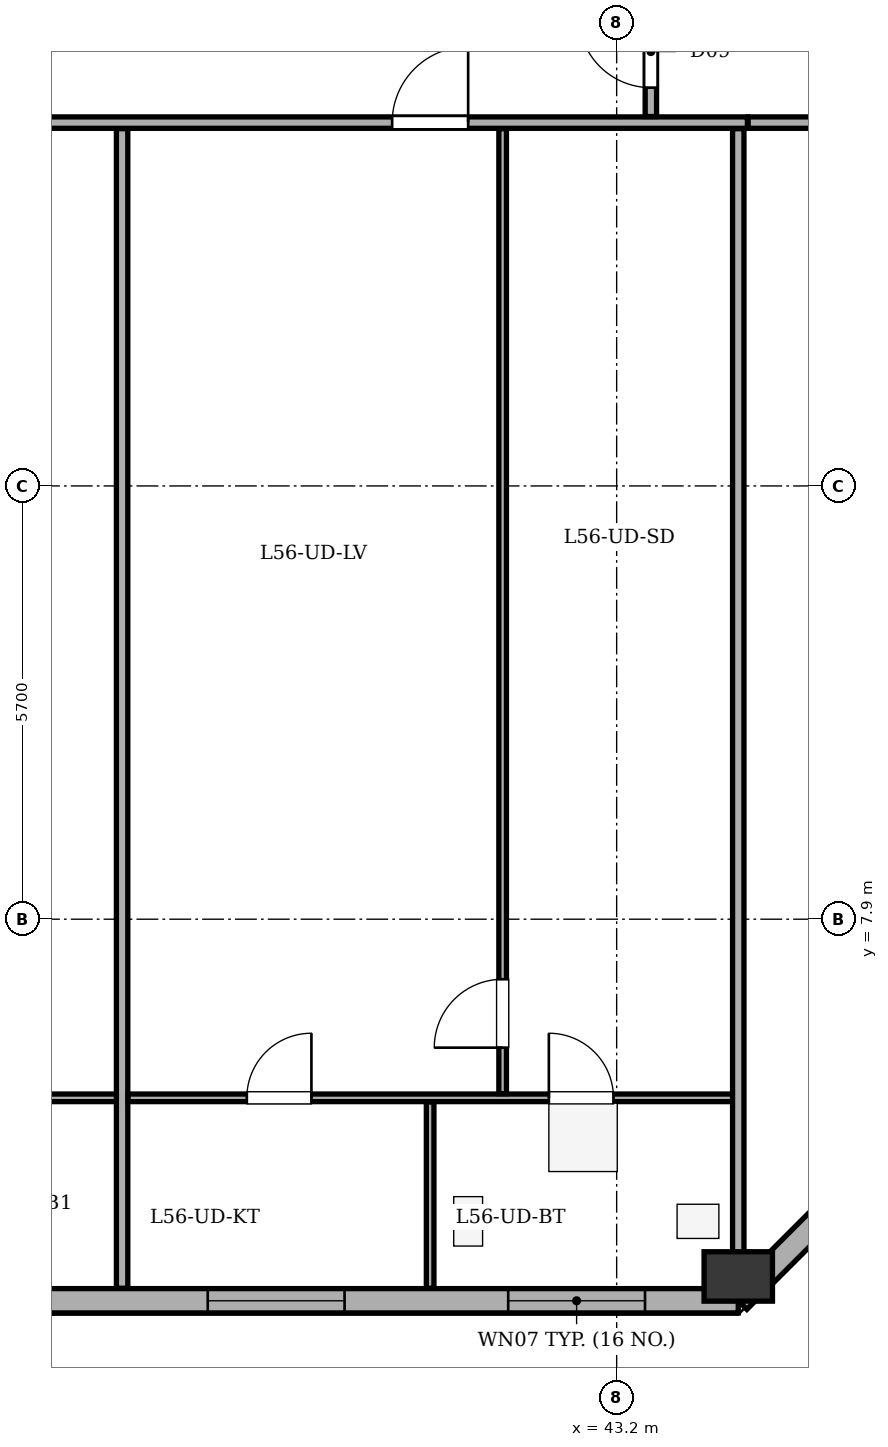
"""IFC4 building model, lengths in metres.
Left out: names, types, materials, properties, quantities, classifications, styles, units other than length and angle.
Written with IfcOpenShell. Run it as: python <this file> out.ifc"""

import sys

from ifc_helpers import new_model, si_unit, direction, frame, frame_2d, origin, origin_2d, place, context, subcontext, project, spatial, rectangle, extrude, element, fill, save


model = new_model("IFC4")
c1 = context("Model", 3, precision=1e-05, world=origin(), true_north=direction((0.0, 1.0)))
c2 = subcontext(c1, "Body", "Model", "MODEL_VIEW")
j1 = project(units=[si_unit("LENGTHUNIT", "METRE"), si_unit("PLANEANGLEUNIT", "RADIAN")], contexts=[c1])
p1 = place(None, origin())
s1 = spatial("IfcSite", under=j1, at=p1, CompositionType="ELEMENT")
p2 = place(p1, origin())
s2 = spatial("IfcBuilding", under=s1, at=p2, CompositionType="ELEMENT")
p3 = place(p2, frame((0.0, 0.0, 217.7)))
s3 = spatial("IfcBuildingStorey", under=s2, at=p3, CompositionType="ELEMENT", Elevation=217.7)
p4 = place(p3, frame((44.8, 3.2, 0.0), z_axis=(0.0, 0.0, 1.0), x_axis=(1.0, 0.0, 0.0)))
e1 = element("IfcColumn", 1, at=p4, inside=s3, PredefinedType="COLUMN", context=c2, shape_type="SweptSolid", body=[
    extrude(rectangle(XDim=0.65, YDim=0.9, at=origin_2d()), origin(), (0.0, 0.0, 1.0), 3.4),
])
p5 = place(p3, frame((44.8, 2.88, 0.0), z_axis=(0.0, 0.0, 1.0), x_axis=(-1.0, 0.0, 0.0)))
e2 = element("IfcWall", 2, at=p5, inside=s3, PredefinedType="STANDARD", context=c2, shape_type="SweptSolid", body=[
    extrude(rectangle(XDim=36.0, YDim=0.32, at=frame_2d((18.0, 0.0))), origin(), (0.0, 0.0, 1.0), 2.725),
])
p6 = place(p5, frame((20.1, 0.0, 0.0)))
e3 = element("IfcOpeningElement", 3, at=p6, cuts=e2, PredefinedType="OPENING", context=c2, shape_type="SweptSolid", body=[
    extrude(rectangle(XDim=1.0, YDim=2.02, at=frame_2d((0.5, 1.01))), frame((0.0, 0.17, 0.0), z_axis=(0.0, -1.0, 0.0), x_axis=(1.0, 0.0, 0.0)), (0.0, 0.0, 1.0), 0.34),
])
p7 = place(p5, frame((1.227, 0.0, 0.75)))
e4 = element("IfcOpeningElement", 4, at=p7, cuts=e2, PredefinedType="OPENING", context=c2, shape_type="SweptSolid", body=[
    extrude(rectangle(XDim=1.8, YDim=1.7, at=frame_2d((0.9, 0.85))), frame((0.0, 0.17, 0.0), z_axis=(0.0, -1.0, 0.0), x_axis=(1.0, 0.0, 0.0)), (0.0, 0.0, 1.0), 0.34),
])
p8 = place(p5, frame((5.18, 0.0, 0.75)))
e5 = element("IfcOpeningElement", 5, at=p8, cuts=e2, PredefinedType="OPENING", context=c2, shape_type="SweptSolid", body=[
    extrude(rectangle(XDim=1.8, YDim=1.7, at=frame_2d((0.9, 0.85))), frame((0.0, 0.17, 0.0), z_axis=(0.0, -1.0, 0.0), x_axis=(1.0, 0.0, 0.0)), (0.0, 0.0, 1.0), 0.34),
])
p9 = place(p5, frame((12.548, 0.0, 0.75)))
e6 = element("IfcOpeningElement", 6, at=p9, cuts=e2, PredefinedType="OPENING", context=c2, shape_type="SweptSolid", body=[
    extrude(rectangle(XDim=1.25, YDim=1.7, at=frame_2d((0.625, 0.85))), frame((0.0, 0.17, 0.0), z_axis=(0.0, -1.0, 0.0), x_axis=(1.0, 0.0, 0.0)), (0.0, 0.0, 1.0), 0.34),
])
p10 = place(p5, frame((26.8, 0.0, 0.75)))
e7 = element("IfcOpeningElement", 7, at=p10, cuts=e2, PredefinedType="OPENING", context=c2, shape_type="SweptSolid", body=[
    extrude(rectangle(XDim=1.8, YDim=1.7, at=frame_2d((0.9, 0.85))), frame((0.0, 0.17, 0.0), z_axis=(0.0, -1.0, 0.0), x_axis=(1.0, 0.0, 0.0)), (0.0, 0.0, 1.0), 0.34),
])
p11 = place(p5, frame((30.854, 0.0, 0.75)))
e8 = element("IfcOpeningElement", 8, at=p11, cuts=e2, PredefinedType="OPENING", context=c2, shape_type="SweptSolid", body=[
    extrude(rectangle(XDim=1.8, YDim=1.7, at=frame_2d((0.9, 0.85))), frame((0.0, 0.17, 0.0), z_axis=(0.0, -1.0, 0.0), x_axis=(1.0, 0.0, 0.0)), (0.0, 0.0, 1.0), 0.34),
])
p12 = place(p5, frame((10.33, 0.0, 0.75)))
e9 = element("IfcOpeningElement", 9, at=p12, cuts=e2, PredefinedType="OPENING", context=c2, shape_type="SweptSolid", body=[
    extrude(rectangle(XDim=0.75, YDim=1.45, at=frame_2d((0.375, 0.725))), frame((0.0, 0.17, 0.0), z_axis=(0.0, -1.0, 0.0), x_axis=(1.0, 0.0, 0.0)), (0.0, 0.0, 1.0), 0.34),
])
p13 = place(p3, frame((49.12, 7.2, 0.0), z_axis=(0.0, 0.0, 1.0), x_axis=(-0.707106781187, -0.707106781187, 0.0)))
e10 = element("IfcWall", 10, at=p13, inside=s3, PredefinedType="STANDARD", context=c2, shape_type="SweptSolid", body=[
    extrude(rectangle(XDim=6.11, YDim=0.32, at=frame_2d((3.055, 0.0))), origin(), (0.0, 0.0, 1.0), 2.725),
])
p14 = place(p13, frame((2.355, 0.0, 0.75)))
e11 = element("IfcOpeningElement", 11, at=p14, cuts=e10, PredefinedType="OPENING", context=c2, shape_type="SweptSolid", body=[
    extrude(rectangle(XDim=1.4, YDim=1.65, at=frame_2d((0.7, 0.825))), frame((0.0, 0.17, 0.0), z_axis=(0.0, -1.0, 0.0), x_axis=(1.0, 0.0, 0.0)), (0.0, 0.0, 1.0), 0.34),
])
p15 = place(p3, frame((10.9, 18.38, 0.0), z_axis=(0.0, 0.0, 1.0), x_axis=(1.0, 0.0, 0.0)))
e12 = element("IfcWall", 12, at=p15, inside=s3, PredefinedType="PARTITIONING", context=c2, shape_type="SweptSolid", body=[
    extrude(rectangle(XDim=34.02, YDim=0.15, at=frame_2d((17.01, 0.0))), origin(), (0.0, 0.0, 1.0), 3.1),
])
p16 = place(p15, frame((3.674, 0.0, 0.0)))
e13 = element("IfcOpeningElement", 13, at=p16, cuts=e12, PredefinedType="OPENING", context=c2, shape_type="SweptSolid", body=[
    extrude(rectangle(XDim=1.0, YDim=2.1, at=frame_2d((0.5, 1.05))), frame((0.0, 0.085, 0.0), z_axis=(0.0, -1.0, 0.0), x_axis=(1.0, 0.0, 0.0)), (0.0, 0.0, 1.0), 0.17),
])
p17 = place(p15, frame((12.118, 0.0, 0.0)))
e14 = element("IfcOpeningElement", 14, at=p17, cuts=e12, PredefinedType="OPENING", context=c2, shape_type="SweptSolid", body=[
    extrude(rectangle(XDim=1.0, YDim=2.1, at=frame_2d((0.5, 1.05))), frame((0.0, 0.085, 0.0), z_axis=(0.0, -1.0, 0.0), x_axis=(1.0, 0.0, 0.0)), (0.0, 0.0, 1.0), 0.17),
])
p18 = place(p15, frame((20.901, 0.0, 0.0)))
e15 = element("IfcOpeningElement", 15, at=p18, cuts=e12, PredefinedType="OPENING", context=c2, shape_type="SweptSolid", body=[
    extrude(rectangle(XDim=1.0, YDim=2.1, at=frame_2d((0.5, 1.05))), frame((0.0, 0.085, 0.0), z_axis=(0.0, -1.0, 0.0), x_axis=(1.0, 0.0, 0.0)), (0.0, 0.0, 1.0), 0.17),
])
p19 = place(p15, frame((29.346, 0.0, 0.0)))
e16 = element("IfcOpeningElement", 16, at=p19, cuts=e12, PredefinedType="OPENING", context=c2, shape_type="SweptSolid", body=[
    extrude(rectangle(XDim=1.0, YDim=2.1, at=frame_2d((0.5, 1.05))), frame((0.0, 0.085, 0.0), z_axis=(0.0, -1.0, 0.0), x_axis=(1.0, 0.0, 0.0)), (0.0, 0.0, 1.0), 0.17),
])
p20 = place(p3, frame((27.99, 5.55, 0.0), z_axis=(0.0, 0.0, 1.0), x_axis=(1.0, 0.0, 0.0)))
e17 = element("IfcWall", 17, at=p20, inside=s3, PredefinedType="PARTITIONING", context=c2, shape_type="SweptSolid", body=[
    extrude(rectangle(XDim=8.743, YDim=0.1, at=frame_2d((4.372, 0.0))), origin(), (0.0, 0.0, 1.0), 3.1),
])
p21 = place(p20, frame((0.625, 0.0, 0.0)))
e18 = element("IfcOpeningElement", 18, at=p21, cuts=e17, PredefinedType="OPENING", context=c2, shape_type="SweptSolid", body=[
    extrude(rectangle(XDim=0.85, YDim=2.05, at=frame_2d((0.425, 1.025))), frame((0.0, 0.06, 0.0), z_axis=(0.0, -1.0, 0.0), x_axis=(1.0, 0.0, 0.0)), (0.0, 0.0, 1.0), 0.12),
])
p22 = place(p20, frame((3.212, 0.0, 0.0)))
e19 = element("IfcOpeningElement", 19, at=p22, cuts=e17, PredefinedType="OPENING", context=c2, shape_type="SweptSolid", body=[
    extrude(rectangle(XDim=0.85, YDim=2.05, at=frame_2d((0.425, 1.025))), frame((0.0, 0.06, 0.0), z_axis=(0.0, -1.0, 0.0), x_axis=(1.0, 0.0, 0.0)), (0.0, 0.0, 1.0), 0.12),
])
p23 = place(p20, frame((6.449, 0.0, 0.0)))
e20 = element("IfcOpeningElement", 20, at=p23, cuts=e17, PredefinedType="OPENING", context=c2, shape_type="SweptSolid", body=[
    extrude(rectangle(XDim=0.9, YDim=2.05, at=frame_2d((0.45, 1.025))), frame((0.0, 0.06, 0.0), z_axis=(0.0, -1.0, 0.0), x_axis=(1.0, 0.0, 0.0)), (0.0, 0.0, 1.0), 0.12),
])
p24 = place(p3, frame((36.693, 3.045, 0.0), z_axis=(0.0, 0.0, 1.0), x_axis=(0.0, 1.0, 0.0)))
e21 = element("IfcWall", 21, at=p24, inside=s3, PredefinedType="PARTITIONING", context=c2, shape_type="SweptSolid", body=[
    extrude(rectangle(XDim=15.255, YDim=0.15, at=frame_2d((7.627, 0.0))), origin(), (0.0, 0.0, 1.0), 2.725),
])
p25 = place(p3, frame((36.773, 5.55, 0.0), z_axis=(0.0, 0.0, 1.0), x_axis=(1.0, 0.0, 0.0)))
e22 = element("IfcWall", 22, at=p25, inside=s3, PredefinedType="PARTITIONING", context=c2, shape_type="SweptSolid", body=[
    extrude(rectangle(XDim=8.067, YDim=0.1, at=frame_2d((4.034, 0.0))), origin(), (0.0, 0.0, 1.0), 3.1),
])
p26 = place(p25, frame((1.561, 0.0, 0.0)))
e23 = element("IfcOpeningElement", 23, at=p26, cuts=e22, PredefinedType="OPENING", context=c2, shape_type="SweptSolid", body=[
    extrude(rectangle(XDim=0.85, YDim=2.05, at=frame_2d((0.425, 1.025))), frame((0.0, 0.06, 0.0), z_axis=(0.0, -1.0, 0.0), x_axis=(1.0, 0.0, 0.0)), (0.0, 0.0, 1.0), 0.12),
])
p27 = place(p25, frame((5.535, 0.0, 0.0)))
e24 = element("IfcOpeningElement", 24, at=p27, cuts=e22, PredefinedType="OPENING", context=c2, shape_type="SweptSolid", body=[
    extrude(rectangle(XDim=0.85, YDim=2.05, at=frame_2d((0.425, 1.025))), frame((0.0, 0.06, 0.0), z_axis=(0.0, -1.0, 0.0), x_axis=(1.0, 0.0, 0.0)), (0.0, 0.0, 1.0), 0.12),
])
p28 = place(p3, frame((41.7, 5.605, 0.0), z_axis=(0.0, 0.0, 1.0), x_axis=(0.0, 1.0, 0.0)))
e25 = element("IfcWall", 25, at=p28, inside=s3, PredefinedType="PARTITIONING", context=c2, shape_type="SweptSolid", body=[
    extrude(rectangle(XDim=12.695, YDim=0.1, at=frame_2d((6.348, 0.0))), origin(), (0.0, 0.0, 1.0), 3.1),
])
p29 = place(p28, frame((0.605, 0.0, 0.0)))
e26 = element("IfcOpeningElement", 26, at=p29, cuts=e25, PredefinedType="OPENING", context=c2, shape_type="SweptSolid", body=[
    extrude(rectangle(XDim=0.9, YDim=2.05, at=frame_2d((0.45, 1.025))), frame((0.0, 0.06, 0.0), z_axis=(0.0, -1.0, 0.0), x_axis=(1.0, 0.0, 0.0)), (0.0, 0.0, 1.0), 0.12),
])
p30 = place(p3, frame((40.746, 3.045, 0.0), z_axis=(0.0, 0.0, 1.0), x_axis=(0.0, 1.0, 0.0)))
e27 = element("IfcWall", 27, at=p30, inside=s3, PredefinedType="PARTITIONING", context=c2, shape_type="SweptSolid", body=[
    extrude(rectangle(XDim=2.45, YDim=0.1, at=frame_2d((1.225, 0.0))), origin(), (0.0, 0.0, 1.0), 3.1),
])
p31 = place(p3, frame((44.8, 3.045, 0.0), z_axis=(0.0, 0.0, 1.0), x_axis=(0.0, 1.0, 0.0)))
e28 = element("IfcWall", 28, at=p31, inside=s3, PredefinedType="PARTITIONING", context=c2, shape_type="SweptSolid", body=[
    extrude(rectangle(XDim=15.255, YDim=0.15, at=frame_2d((7.627, 0.0))), origin(), (0.0, 0.0, 1.0), 3.1),
])
p32 = place(p3, frame((44.93, 18.38, 0.0), z_axis=(0.0, 0.0, 1.0), x_axis=(1.0, 0.0, 0.0)))
e29 = element("IfcWall", 29, at=p32, inside=s3, PredefinedType="PARTITIONING", context=c2, shape_type="SweptSolid", body=[
    extrude(rectangle(XDim=4.025, YDim=0.15, at=frame_2d((2.013, 0.0))), origin(), (0.0, 0.0, 1.0), 3.1),
])
p33 = place(p3, frame((43.65, 18.46, 0.0), z_axis=(0.0, 0.0, 1.0), x_axis=(0.0, 1.0, 0.0)))
e30 = element("IfcWall", 30, at=p33, inside=s3, PredefinedType="PARTITIONING", context=c2, shape_type="SweptSolid", body=[
    extrude(rectangle(XDim=1.79, YDim=0.15, at=frame_2d((0.895, 0.0))), origin(), (0.0, 0.0, 1.0), 3.1),
])
p34 = place(p33, frame((0.38, 0.0, 0.0)))
e31 = element("IfcOpeningElement", 31, at=p34, cuts=e30, PredefinedType="OPENING", context=c2, shape_type="SweptSolid", body=[
    extrude(rectangle(XDim=0.95, YDim=2.1, at=frame_2d((0.475, 1.05))), frame((0.0, 0.085, 0.0), z_axis=(0.0, -1.0, 0.0), x_axis=(1.0, 0.0, 0.0)), (0.0, 0.0, 1.0), 0.17),
])
p35 = place(p7, origin())
e32 = element("IfcWindow", 32, at=p35, inside=s3, PartitioningType="SINGLE_PANEL", PredefinedType="WINDOW", context=c2, shape_type="SweptSolid", body=[
    extrude(rectangle(XDim=1.8, YDim=1.7, at=frame_2d((0.9, 0.85))), frame((0.0, -0.01, 0.0), z_axis=(0.0, -1.0, 0.0), x_axis=(1.0, 0.0, 0.0)), (0.0, 0.0, 1.0), 0.06),
])
fill(e4, e32)
p36 = place(p8, origin())
e33 = element("IfcWindow", 33, at=p36, inside=s3, PartitioningType="SINGLE_PANEL", PredefinedType="WINDOW", context=c2, shape_type="SweptSolid", body=[
    extrude(rectangle(XDim=1.8, YDim=1.7, at=frame_2d((0.9, 0.85))), frame((0.0, -0.01, 0.0), z_axis=(0.0, -1.0, 0.0), x_axis=(1.0, 0.0, 0.0)), (0.0, 0.0, 1.0), 0.06),
])
fill(e5, e33)
p37 = place(p19, origin())
e34 = element("IfcDoor", 34, at=p37, inside=s3, OperationType="SINGLE_SWING_RIGHT", PredefinedType="DOOR", context=c2, shape_type="SweptSolid", body=[
    extrude(rectangle(XDim=1.0, YDim=2.1, at=frame_2d((0.5, 1.05))), frame((0.0, 0.025, 0.0), z_axis=(0.0, -1.0, 0.0), x_axis=(1.0, 0.0, 0.0)), (0.0, 0.0, 1.0), 0.05),
])
fill(e16, e34)
p38 = place(p29, origin())
e35 = element("IfcDoor", 35, at=p38, inside=s3, OperationType="SINGLE_SWING_LEFT", PredefinedType="DOOR", context=c2, shape_type="SweptSolid", body=[
    extrude(rectangle(XDim=0.9, YDim=2.05, at=frame_2d((0.45, 1.025))), frame((0.0, 0.025, 0.0), z_axis=(0.0, -1.0, 0.0), x_axis=(1.0, 0.0, 0.0)), (0.0, 0.0, 1.0), 0.05),
])
fill(e26, e35)
p39 = place(p26, origin())
e36 = element("IfcDoor", 36, at=p39, inside=s3, OperationType="SINGLE_SWING_RIGHT", PredefinedType="DOOR", context=c2, shape_type="SweptSolid", body=[
    extrude(rectangle(XDim=0.85, YDim=2.05, at=frame_2d((0.425, 1.025))), frame((0.0, 0.025, 0.0), z_axis=(0.0, -1.0, 0.0), x_axis=(1.0, 0.0, 0.0)), (0.0, 0.0, 1.0), 0.05),
])
fill(e23, e36)
p40 = place(p27, origin())
e37 = element("IfcDoor", 37, at=p40, inside=s3, OperationType="SINGLE_SWING_LEFT", PredefinedType="DOOR", context=c2, shape_type="SweptSolid", body=[
    extrude(rectangle(XDim=0.85, YDim=2.05, at=frame_2d((0.425, 1.025))), frame((0.0, 0.025, 0.0), z_axis=(0.0, -1.0, 0.0), x_axis=(1.0, 0.0, 0.0)), (0.0, 0.0, 1.0), 0.05),
])
fill(e24, e37)
p41 = place(p34, origin())
e38 = element("IfcDoor", 38, at=p41, inside=s3, OperationType="SINGLE_SWING_RIGHT", PredefinedType="DOOR", context=c2, shape_type="SweptSolid", body=[
    extrude(rectangle(XDim=0.95, YDim=2.1, at=frame_2d((0.475, 1.05))), frame((0.0, 0.025, 0.0), z_axis=(0.0, -1.0, 0.0), x_axis=(1.0, 0.0, 0.0)), (0.0, 0.0, 1.0), 0.05),
])
fill(e31, e38)
save(model, sys.argv[1])
